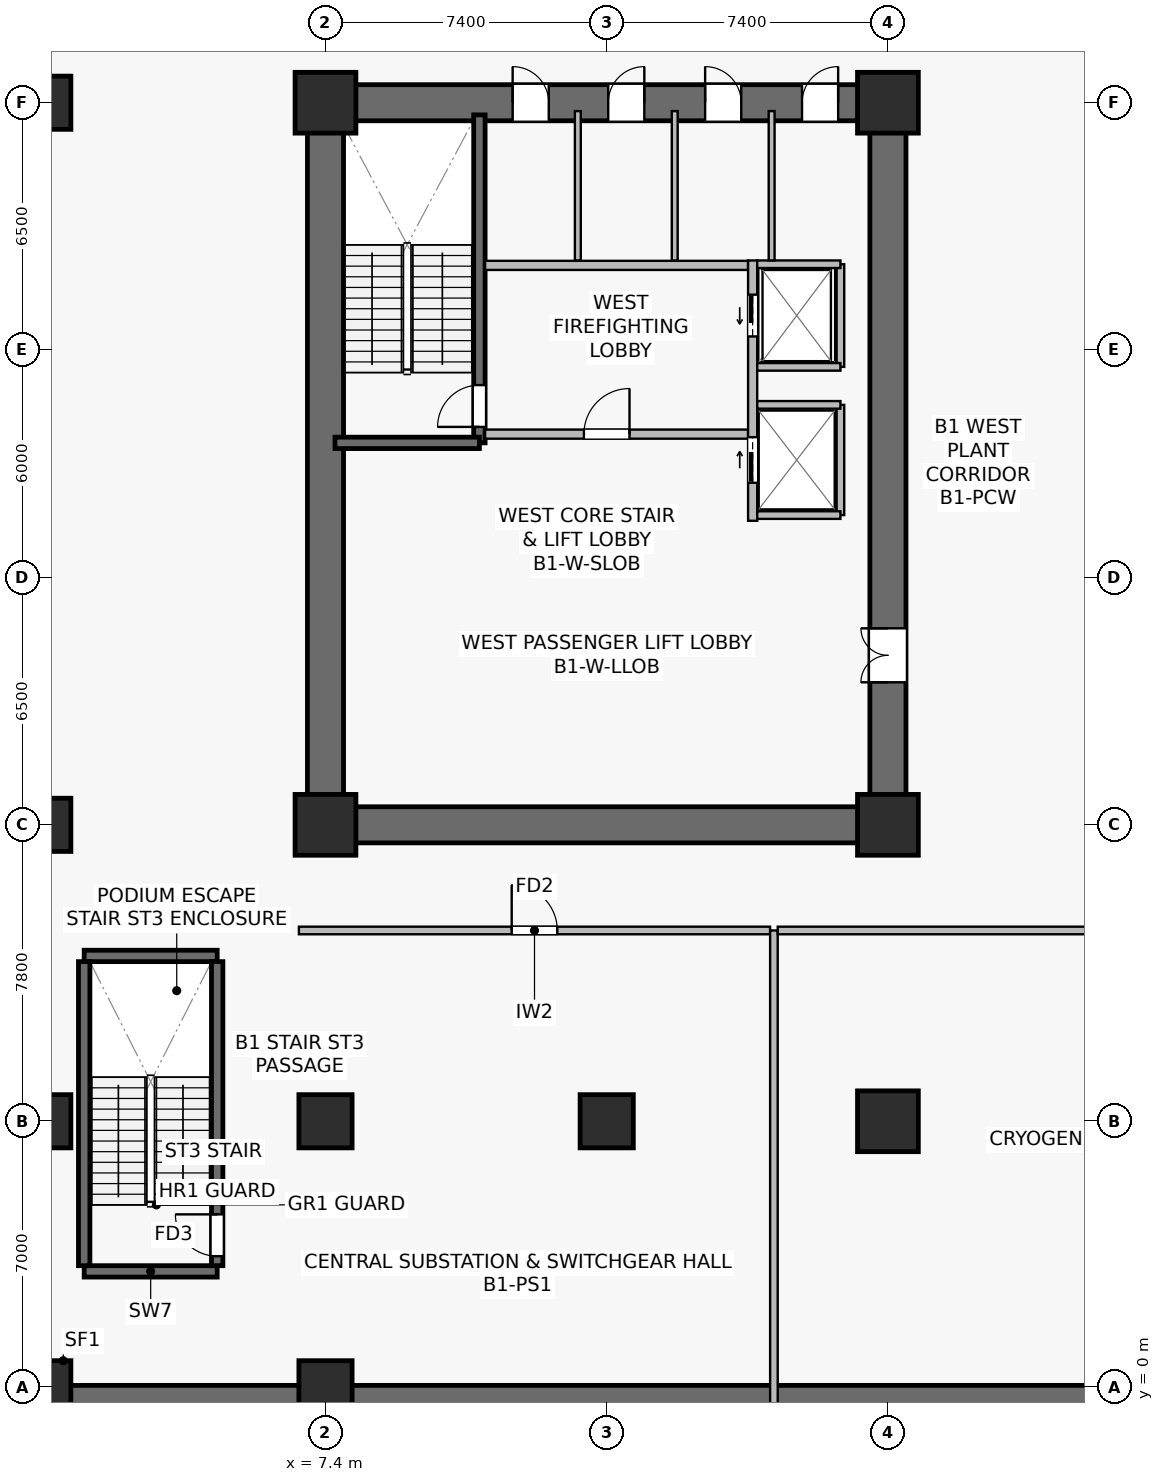
"""IFC4 building model, lengths in metres.
Left out: names, types, materials, properties, quantities, classifications, styles, units other than length and angle.
Written with IfcOpenShell. Run it as: python <this file> out.ifc"""

import sys

from ifc_helpers import new_model, si_unit, direction, frame, frame_2d, origin, origin_2d, place, context, subcontext, project, spatial, rectangle, extrude, source, transform, mapped, element, fill, save


model = new_model("IFC4")
c1 = context("Model", 3, precision=1e-05, world=origin(), true_north=direction((0.0, 1.0)))
c2 = subcontext(c1, "Body", "Model", "MODEL_VIEW")
j1 = project(units=[si_unit("LENGTHUNIT", "METRE"), si_unit("PLANEANGLEUNIT", "RADIAN")], contexts=[c1])
p1 = place(None, origin())
s1 = spatial("IfcSite", under=j1, at=p1, CompositionType="ELEMENT")
p2 = place(p1, origin())
s2 = spatial("IfcBuilding", under=s1, at=p2, CompositionType="ELEMENT")
p3 = place(p2, frame((0.0, 0.0, -4.8)))
s3 = spatial("IfcBuildingStorey", under=s2, at=p3, CompositionType="ELEMENT", Elevation=-4.8)
p4 = place(p3, frame((6.925, 14.8, 0.0), z_axis=(0.0, 0.0, 1.0), x_axis=(1.0, 0.0, 0.0)))
e1 = element("IfcWall", 1, at=p4, inside=s3, PredefinedType="SHEAR", context=c2, shape_type="SweptSolid", body=[
    extrude(rectangle(XDim=15.75, YDim=0.95, at=frame_2d((7.875, 0.0))), origin(), (0.0, 0.0, 1.0), 4.45),
])
p5 = place(p3, frame((6.925, 33.8, 0.0), z_axis=(0.0, 0.0, 1.0), x_axis=(1.0, 0.0, 0.0)))
e2 = element("IfcWall", 2, at=p5, inside=s3, PredefinedType="SHEAR", context=c2, shape_type="SweptSolid", body=[
    extrude(rectangle(XDim=15.75, YDim=0.95, at=frame_2d((7.875, 0.0))), origin(), (0.0, 0.0, 1.0), 4.45),
])
p6 = place(p5, frame((5.4, 0.0, 0.0)))
e3 = element("IfcOpeningElement", 3, at=p6, cuts=e2, PredefinedType="OPENING", context=c2, shape_type="SweptSolid", body=[
    extrude(rectangle(XDim=0.95, YDim=2.15, at=frame_2d((0.475, 1.075))), frame((0.0, 0.485, 0.0), z_axis=(0.0, -1.0, 0.0), x_axis=(1.0, 0.0, 0.0)), (0.0, 0.0, 1.0), 0.97),
])
p7 = place(p5, frame((7.915, 0.0, 0.0)))
e4 = element("IfcOpeningElement", 4, at=p7, cuts=e2, PredefinedType="OPENING", context=c2, shape_type="SweptSolid", body=[
    extrude(rectangle(XDim=0.95, YDim=2.15, at=frame_2d((0.475, 1.075))), frame((0.0, 0.485, 0.0), z_axis=(0.0, -1.0, 0.0), x_axis=(1.0, 0.0, 0.0)), (0.0, 0.0, 1.0), 0.97),
])
p8 = place(p5, frame((10.465, 0.0, 0.0)))
e5 = element("IfcOpeningElement", 5, at=p8, cuts=e2, PredefinedType="OPENING", context=c2, shape_type="SweptSolid", body=[
    extrude(rectangle(XDim=0.95, YDim=2.15, at=frame_2d((0.475, 1.075))), frame((0.0, 0.485, 0.0), z_axis=(0.0, -1.0, 0.0), x_axis=(1.0, 0.0, 0.0)), (0.0, 0.0, 1.0), 0.97),
])
p9 = place(p5, frame((13.015, 0.0, 0.0)))
e6 = element("IfcOpeningElement", 6, at=p9, cuts=e2, PredefinedType="OPENING", context=c2, shape_type="SweptSolid", body=[
    extrude(rectangle(XDim=0.95, YDim=2.15, at=frame_2d((0.475, 1.075))), frame((0.0, 0.485, 0.0), z_axis=(0.0, -1.0, 0.0), x_axis=(1.0, 0.0, 0.0)), (0.0, 0.0, 1.0), 0.97),
])
p10 = place(p3, frame((7.4, 15.275, 0.0), z_axis=(0.0, 0.0, 1.0), x_axis=(0.0, 1.0, 0.0)))
e7 = element("IfcWall", 7, at=p10, inside=s3, PredefinedType="SHEAR", context=c2, shape_type="SweptSolid", body=[
    extrude(rectangle(XDim=18.05, YDim=0.95, at=frame_2d((9.025, 0.0))), origin(), (0.0, 0.0, 1.0), 4.45),
])
p11 = place(p3, frame((22.2, 15.275, 0.0), z_axis=(0.0, 0.0, 1.0), x_axis=(0.0, 1.0, 0.0)))
e8 = element("IfcWall", 8, at=p11, inside=s3, PredefinedType="SHEAR", context=c2, shape_type="SweptSolid", body=[
    extrude(rectangle(XDim=18.05, YDim=0.95, at=frame_2d((9.025, 0.0))), origin(), (0.0, 0.0, 1.0), 4.45),
])
p12 = place(p11, frame((3.275, 0.0, 0.0)))
e9 = element("IfcOpeningElement", 9, at=p12, cuts=e8, PredefinedType="OPENING", context=c2, shape_type="SweptSolid", body=[
    extrude(rectangle(XDim=1.42, YDim=2.2, at=frame_2d((0.71, 1.1))), frame((0.0, 0.485, 0.0), z_axis=(0.0, -1.0, 0.0), x_axis=(1.0, 0.0, 0.0)), (0.0, 0.0, 1.0), 0.97),
])
p13 = place(p3, frame((11.45, 24.85, 0.0), z_axis=(0.0, 0.0, 1.0), x_axis=(0.0, 1.0, 0.0)))
e10 = element("IfcWall", 10, at=p13, inside=s3, PredefinedType="SHEAR", context=c2, shape_type="SweptSolid", body=[
    extrude(rectangle(XDim=8.63, YDim=0.3, at=frame_2d((4.315, 0.0))), origin(), (0.0, 0.0, 1.0), 4.45),
])
p14 = place(p13, frame((0.42, 0.0, 0.0)))
e11 = element("IfcOpeningElement", 11, at=p14, cuts=e10, PredefinedType="OPENING", context=c2, shape_type="SweptSolid", body=[
    extrude(rectangle(XDim=1.1, YDim=2.15, at=frame_2d((0.55, 1.075))), frame((0.0, 0.16, 0.0), z_axis=(0.0, -1.0, 0.0), x_axis=(1.0, 0.0, 0.0)), (0.0, 0.0, 1.0), 0.32),
])
p15 = place(p3, frame((7.65, 24.85, 0.0), z_axis=(0.0, 0.0, 1.0), x_axis=(1.0, 0.0, 0.0)))
e12 = element("IfcWall", 12, at=p15, inside=s3, PredefinedType="SHEAR", context=c2, shape_type="SweptSolid", body=[
    extrude(rectangle(XDim=3.8, YDim=0.3, at=frame_2d((1.9, 0.0))), origin(), (0.0, 0.0, 1.0), 4.45),
])
for number, where, z_axis, x_axis in (
    (13, (1.05, 3.05, 0.0), (0.0, 0.0, 1.0), (1.0, 0.0, 0.0)),
    (14, (1.05, 11.35, 0.0), (0.0, 0.0, 1.0), (1.0, 0.0, 0.0)),
):
    element("IfcWall", number, at=place(p3, frame(where, z_axis=z_axis, x_axis=x_axis)), inside=s3, PredefinedType="SHEAR", context=c2, shape_type="SweptSolid", body=[
        extrude(rectangle(XDim=3.5, YDim=0.3, at=frame_2d((1.75, 0.0))), origin(), (0.0, 0.0, 1.0), 4.45),
    ])
p16 = place(p3, frame((1.05, 3.2, 0.0), z_axis=(0.0, 0.0, 1.0), x_axis=(0.0, 1.0, 0.0)))
e15 = element("IfcWall", 15, at=p16, inside=s3, PredefinedType="SHEAR", context=c2, shape_type="SweptSolid", body=[
    extrude(rectangle(XDim=8.0, YDim=0.3, at=frame_2d((4.0, 0.0))), origin(), (0.0, 0.0, 1.0), 4.45),
])
p17 = place(p3, frame((4.55, 3.2, 0.0), z_axis=(0.0, 0.0, 1.0), x_axis=(0.0, 1.0, 0.0)))
e16 = element("IfcWall", 16, at=p17, inside=s3, PredefinedType="SHEAR", context=c2, shape_type="SweptSolid", body=[
    extrude(rectangle(XDim=8.0, YDim=0.3, at=frame_2d((4.0, 0.0))), origin(), (0.0, 0.0, 1.0), 4.45),
])
p18 = place(p17, frame((0.25, 0.0, 0.0)))
e17 = element("IfcOpeningElement", 17, at=p18, cuts=e16, PredefinedType="OPENING", context=c2, shape_type="SweptSolid", body=[
    extrude(rectangle(XDim=1.1, YDim=2.15, at=frame_2d((0.55, 1.075))), frame((0.0, 0.16, 0.0), z_axis=(0.0, -1.0, 0.0), x_axis=(1.0, 0.0, 0.0)), (0.0, 0.0, 1.0), 0.32),
])
p19 = place(p3, frame((-1.0, -0.375, 0.0), z_axis=(0.0, 0.0, 1.0), x_axis=(1.0, 0.0, 0.0)))
e18 = element("IfcWall", 18, at=p19, inside=s3, PredefinedType="SOLIDWALL", context=c2, shape_type="SweptSolid", body=[
    extrude(rectangle(XDim=76.8, YDim=0.85, at=frame_2d((38.4, 0.0))), origin(), (0.0, 0.0, 1.0), 4.45),
])
m1 = source(origin(), c2, "Body", "SweptSolid", [
    extrude(rectangle(XDim=1.4, YDim=1.4, at=origin_2d()), origin(), (0.0, 0.0, 1.0), 4.8),
])
p20 = place(p3, frame((14.8, 7.0, 0.0), z_axis=(0.0, 0.0, 1.0), x_axis=(1.0, 0.0, 0.0)))
e19 = element("IfcColumn", 19, at=p20, inside=s3, PredefinedType="COLUMN", context=c2, shape_type="MappedRepresentation", body=[
    mapped(m1, transform((0.0, 0.0, 0.0), scale=1.0)),
])
m2 = source(origin(), c2, "Body", "SweptSolid", [
    extrude(rectangle(XDim=1.6, YDim=1.6, at=origin_2d()), origin(), (0.0, 0.0, 1.0), 4.8),
])
for number, where, z_axis, x_axis in (
    (20, (22.2, 7.0, 0.0), (0.0, 0.0, 1.0), (1.0, 0.0, 0.0)),
    (21, (7.4, 14.8, 0.0), (0.0, 0.0, 1.0), (1.0, 0.0, 0.0)),
    (22, (22.2, 14.8, 0.0), (0.0, 0.0, 1.0), (1.0, 0.0, 0.0)),
    (23, (7.4, 33.8, 0.0), (0.0, 0.0, 1.0), (1.0, 0.0, 0.0)),
    (24, (22.2, 33.8, 0.0), (0.0, 0.0, 1.0), (1.0, 0.0, 0.0)),
):
    element("IfcColumn", number, at=place(p3, frame(where, z_axis=z_axis, x_axis=x_axis)), inside=s3, PredefinedType="COLUMN", context=c2, shape_type="MappedRepresentation", body=[
        mapped(m2, transform((0.0, 0.0, 0.0), scale=1.0)),
    ])
for number, where, z_axis, x_axis in (
    (25, (7.4, 7.0, 0.0), (0.0, 0.0, 1.0), (1.0, 0.0, 0.0)),
    (26, (0.0, 7.0, 0.0), (0.0, 0.0, 1.0), (1.0, 0.0, 0.0)),
    (27, (0.0, 14.8, 0.0), (0.0, 0.0, 1.0), (1.0, 0.0, 0.0)),
    (28, (0.0, 33.8, 0.0), (0.0, 0.0, 1.0), (1.0, 0.0, 0.0)),
    (29, (0.0, 0.0, 0.0), (0.0, 0.0, 1.0), (1.0, 0.0, 0.0)),
    (30, (7.4, 0.0, 0.0), (0.0, 0.0, 1.0), (1.0, 0.0, 0.0)),
):
    element("IfcColumn", number, at=place(p3, frame(where, z_axis=z_axis, x_axis=x_axis)), inside=s3, PredefinedType="COLUMN", context=c2, shape_type="MappedRepresentation", body=[
        mapped(m1, transform((0.0, 0.0, 0.0), scale=1.0)),
    ])
p21 = place(p3, frame((11.6, 25.08, 0.0), z_axis=(0.0, 0.0, 1.0), x_axis=(1.0, 0.0, 0.0)))
e31 = element("IfcWall", 31, at=p21, inside=s3, PredefinedType="SOLIDWALL", context=c2, shape_type="SweptSolid", body=[
    extrude(rectangle(XDim=6.92, YDim=0.24, at=frame_2d((3.46, 0.0))), origin(), (0.0, 0.0, 1.0), 3.685),
])
p22 = place(p21, frame((2.6, 0.0, 0.0)))
e32 = element("IfcOpeningElement", 32, at=p22, cuts=e31, PredefinedType="OPENING", context=c2, shape_type="SweptSolid", body=[
    extrude(rectangle(XDim=1.2, YDim=2.16, at=frame_2d((0.6, 1.08))), frame((0.0, 0.13, 0.0), z_axis=(0.0, -1.0, 0.0), x_axis=(1.0, 0.0, 0.0)), (0.0, 0.0, 1.0), 0.26),
])
p23 = place(p3, frame((11.6, 29.52, 0.0), z_axis=(0.0, 0.0, 1.0), x_axis=(1.0, 0.0, 0.0)))
e33 = element("IfcWall", 33, at=p23, inside=s3, PredefinedType="SOLIDWALL", context=c2, shape_type="SweptSolid", body=[
    extrude(rectangle(XDim=6.92, YDim=0.24, at=frame_2d((3.46, 0.0))), origin(), (0.0, 0.0, 1.0), 3.685),
])
p24 = place(p3, frame((18.64, 22.8, 0.0), z_axis=(0.0, 0.0, 1.0), x_axis=(0.0, 1.0, 0.0)))
e34 = element("IfcWall", 34, at=p24, inside=s3, PredefinedType="SOLIDWALL", context=c2, shape_type="SweptSolid", body=[
    extrude(rectangle(XDim=6.85, YDim=0.24, at=frame_2d((3.425, 0.0))), origin(), (0.0, 0.0, 1.0), 3.535),
])
p25 = place(p24, frame((4.85, 0.0, 0.0)))
e35 = element("IfcOpeningElement", 35, at=p25, cuts=e34, PredefinedType="OPENING", context=c2, shape_type="SweptSolid", body=[
    extrude(rectangle(XDim=1.1, YDim=2.22, at=frame_2d((0.55, 1.11))), frame((0.0, 0.13, 0.0), z_axis=(0.0, -1.0, 0.0), x_axis=(1.0, 0.0, 0.0)), (0.0, 0.0, 1.0), 0.26),
])
p26 = place(p24, frame((1.0, 0.0, 0.0)))
e36 = element("IfcOpeningElement", 36, at=p26, cuts=e34, PredefinedType="OPENING", context=c2, shape_type="SweptSolid", body=[
    extrude(rectangle(XDim=1.2, YDim=2.22, at=frame_2d((0.6, 1.11))), frame((0.0, 0.13, 0.0), z_axis=(0.0, -1.0, 0.0), x_axis=(1.0, 0.0, 0.0)), (0.0, 0.0, 1.0), 0.26),
])
p27 = place(p3, frame((20.95, 26.85, 0.0), z_axis=(0.0, 0.0, 1.0), x_axis=(0.0, 1.0, 0.0)))
e37 = element("IfcWall", 37, at=p27, inside=s3, PredefinedType="SOLIDWALL", context=c2, shape_type="SweptSolid", body=[
    extrude(rectangle(XDim=2.7, YDim=0.2, at=frame_2d((1.35, 0.0))), origin(), (0.0, 0.0, 1.0), 4.45),
])
p28 = place(p3, frame((18.76, 29.55, 0.0), z_axis=(0.0, 0.0, 1.0), x_axis=(1.0, 0.0, 0.0)))
e38 = element("IfcWall", 38, at=p28, inside=s3, PredefinedType="SOLIDWALL", context=c2, shape_type="SweptSolid", body=[
    extrude(rectangle(XDim=2.19, YDim=0.2, at=frame_2d((1.095, 0.0))), origin(), (0.0, 0.0, 1.0), 4.45),
])
p29 = place(p3, frame((18.76, 26.85, 0.0), z_axis=(0.0, 0.0, 1.0), x_axis=(1.0, 0.0, 0.0)))
e39 = element("IfcWall", 39, at=p29, inside=s3, PredefinedType="SOLIDWALL", context=c2, shape_type="SweptSolid", body=[
    extrude(rectangle(XDim=2.19, YDim=0.2, at=frame_2d((1.095, 0.0))), origin(), (0.0, 0.0, 1.0), 3.847),
])
p30 = place(p3, frame((20.95, 22.95, 0.0), z_axis=(0.0, 0.0, 1.0), x_axis=(0.0, 1.0, 0.0)))
e40 = element("IfcWall", 40, at=p30, inside=s3, PredefinedType="SOLIDWALL", context=c2, shape_type="SweptSolid", body=[
    extrude(rectangle(XDim=2.9, YDim=0.2, at=frame_2d((1.45, 0.0))), origin(), (0.0, 0.0, 1.0), 3.535),
])
for number, where, z_axis, x_axis in (
    (41, (18.76, 25.85, 0.0), (0.0, 0.0, 1.0), (1.0, 0.0, 0.0)),
    (42, (18.76, 22.95, 0.0), (0.0, 0.0, 1.0), (1.0, 0.0, 0.0)),
):
    element("IfcWall", number, at=place(p3, frame(where, z_axis=z_axis, x_axis=x_axis)), inside=s3, PredefinedType="SOLIDWALL", context=c2, shape_type="SweptSolid", body=[
        extrude(rectangle(XDim=2.19, YDim=0.2, at=frame_2d((1.095, 0.0))), origin(), (0.0, 0.0, 1.0), 4.45),
    ])
for number, where, z_axis, x_axis in (
    (43, (14.04, 29.65, 0.0), (0.0, 0.0, 1.0), (0.0, 1.0, 0.0)),
    (44, (16.59, 29.65, 0.0), (0.0, 0.0, 1.0), (0.0, 1.0, 0.0)),
    (45, (19.14, 29.65, 0.0), (0.0, 0.0, 1.0), (0.0, 1.0, 0.0)),
):
    element("IfcWall", number, at=place(p3, frame(where, z_axis=z_axis, x_axis=x_axis)), inside=s3, PredefinedType="PLUMBINGWALL", context=c2, shape_type="SweptSolid", body=[
        extrude(rectangle(XDim=3.93, YDim=0.155, at=frame_2d((1.965, 0.0))), origin(), (0.0, 0.0, 1.0), 4.45),
    ])
p31 = place(p3, frame((6.7, 12.02, 0.0), z_axis=(0.0, 0.0, 1.0), x_axis=(1.0, 0.0, 0.0)))
e46 = element("IfcWall", 46, at=p31, inside=s3, PredefinedType="SOLIDWALL", context=c2, shape_type="SweptSolid", body=[
    extrude(rectangle(XDim=12.4, YDim=0.2, at=frame_2d((6.2, 0.0))), origin(), (0.0, 0.0, 1.0), 3.685),
])
p32 = place(p31, frame((5.6, 0.0, 0.0)))
e47 = element("IfcOpeningElement", 47, at=p32, cuts=e46, PredefinedType="OPENING", context=c2, shape_type="SweptSolid", body=[
    extrude(rectangle(XDim=1.2, YDim=2.16, at=frame_2d((0.6, 1.08))), frame((0.0, 0.11, 0.0), z_axis=(0.0, -1.0, 0.0), x_axis=(1.0, 0.0, 0.0)), (0.0, 0.0, 1.0), 0.22),
])
p33 = place(p3, frame((19.2, -0.69, 0.0), z_axis=(0.0, 0.0, 1.0), x_axis=(0.0, 1.0, 0.0)))
e48 = element("IfcWall", 48, at=p33, inside=s3, PredefinedType="SOLIDWALL", context=c2, shape_type="SweptSolid", body=[
    extrude(rectangle(XDim=12.71, YDim=0.2, at=frame_2d((6.355, 0.0))), origin(), (0.0, 0.0, 1.0), 3.635),
])
p34 = place(p3, frame((19.3, 12.02, 0.0), z_axis=(0.0, 0.0, 1.0), x_axis=(1.0, 0.0, 0.0)))
e49 = element("IfcWall", 49, at=p34, inside=s3, PredefinedType="SOLIDWALL", context=c2, shape_type="SweptSolid", body=[
    extrude(rectangle(XDim=19.4, YDim=0.2, at=frame_2d((9.7, 0.0))), origin(), (0.0, 0.0, 1.0), 3.685),
])
p35 = place(p34, frame((9.1, 0.0, 0.0)))
e50 = element("IfcOpeningElement", 50, at=p35, cuts=e49, PredefinedType="OPENING", context=c2, shape_type="SweptSolid", body=[
    extrude(rectangle(XDim=1.2, YDim=2.16, at=frame_2d((0.6, 1.08))), frame((0.0, 0.11, 0.0), z_axis=(0.0, -1.0, 0.0), x_axis=(1.0, 0.0, 0.0)), (0.0, 0.0, 1.0), 0.22),
])
m3 = source(origin(), c2, "Body", "SweptSolid", [
    extrude(rectangle(XDim=1.1, YDim=2.15, at=frame_2d((0.55, 1.075))), frame((0.0, 0.025, 0.0), z_axis=(0.0, -1.0, 0.0), x_axis=(1.0, 0.0, 0.0)), (0.0, 0.0, 1.0), 0.05),
])
p36 = place(p14, origin())
e51 = element("IfcDoor", 51, at=p36, inside=s3, OperationType="SINGLE_SWING_LEFT", PredefinedType="DOOR", context=c2, shape_type="MappedRepresentation", body=[
    mapped(m3, transform((0.0, 0.0, 0.0), scale=1.0)),
])
fill(e11, e51)
m4 = source(origin(), c2, "Body", "SweptSolid", [
    extrude(rectangle(XDim=1.2, YDim=2.16, at=frame_2d((0.6, 1.08))), frame((0.0, 0.025, 0.0), z_axis=(0.0, -1.0, 0.0), x_axis=(1.0, 0.0, 0.0)), (0.0, 0.0, 1.0), 0.05),
])
p37 = place(p22, origin())
e52 = element("IfcDoor", 52, at=p37, inside=s3, OperationType="SINGLE_SWING_RIGHT", PredefinedType="DOOR", context=c2, shape_type="MappedRepresentation", body=[
    mapped(m4, transform((0.0, 0.0, 0.0), scale=1.0)),
])
fill(e32, e52)
m5 = source(origin(), c2, "Body", "SweptSolid", [
    extrude(rectangle(XDim=1.1, YDim=2.22, at=frame_2d((0.55, 1.11))), frame((0.0, 0.025, 0.0), z_axis=(0.0, -1.0, 0.0), x_axis=(1.0, 0.0, 0.0)), (0.0, 0.0, 1.0), 0.05),
])
p38 = place(p25, origin())
e53 = element("IfcDoor", 53, at=p38, inside=s3, OperationType="SLIDING_TO_LEFT", PredefinedType="USERDEFINED", context=c2, shape_type="MappedRepresentation", body=[
    mapped(m5, transform((0.0, 0.0, 0.0), scale=1.0)),
])
fill(e35, e53)
m6 = source(origin(), c2, "Body", "SweptSolid", [
    extrude(rectangle(XDim=1.2, YDim=2.22, at=frame_2d((0.6, 1.11))), frame((0.0, 0.025, 0.0), z_axis=(0.0, -1.0, 0.0), x_axis=(1.0, 0.0, 0.0)), (0.0, 0.0, 1.0), 0.05),
])
p39 = place(p26, origin())
e54 = element("IfcDoor", 54, at=p39, inside=s3, OperationType="SLIDING_TO_RIGHT", PredefinedType="USERDEFINED", context=c2, shape_type="MappedRepresentation", body=[
    mapped(m6, transform((0.0, 0.0, 0.0), scale=1.0)),
])
fill(e36, e54)
m7 = source(origin(), c2, "Body", "SweptSolid", [
    extrude(rectangle(XDim=1.42, YDim=2.2, at=frame_2d((0.71, 1.1))), frame((0.0, 0.025, 0.0), z_axis=(0.0, -1.0, 0.0), x_axis=(1.0, 0.0, 0.0)), (0.0, 0.0, 1.0), 0.05),
])
p40 = place(p12, origin())
e55 = element("IfcDoor", 55, at=p40, inside=s3, OperationType="DOUBLE_DOOR_SINGLE_SWING", PredefinedType="DOOR", context=c2, shape_type="MappedRepresentation", body=[
    mapped(m7, transform((0.0, 0.0, 0.0), scale=1.0)),
])
fill(e9, e55)
m8 = source(origin(), c2, "Body", "SweptSolid", [
    extrude(rectangle(XDim=0.95, YDim=2.15, at=frame_2d((0.475, 1.075))), frame((0.0, 0.025, 0.0), z_axis=(0.0, -1.0, 0.0), x_axis=(1.0, 0.0, 0.0)), (0.0, 0.0, 1.0), 0.05),
])
p41 = place(p6, origin())
e56 = element("IfcDoor", 56, at=p41, inside=s3, OperationType="SINGLE_SWING_LEFT", PredefinedType="DOOR", context=c2, shape_type="MappedRepresentation", body=[
    mapped(m8, transform((0.0, 0.0, 0.0), scale=1.0)),
])
fill(e3, e56)
p42 = place(p7, origin())
e57 = element("IfcDoor", 57, at=p42, inside=s3, OperationType="SINGLE_SWING_RIGHT", PredefinedType="DOOR", context=c2, shape_type="MappedRepresentation", body=[
    mapped(m8, transform((0.0, 0.0, 0.0), scale=1.0)),
])
fill(e4, e57)
p43 = place(p8, origin())
e58 = element("IfcDoor", 58, at=p43, inside=s3, OperationType="SINGLE_SWING_LEFT", PredefinedType="DOOR", context=c2, shape_type="MappedRepresentation", body=[
    mapped(m8, transform((0.0, 0.0, 0.0), scale=1.0)),
])
fill(e5, e58)
p44 = place(p9, origin())
e59 = element("IfcDoor", 59, at=p44, inside=s3, OperationType="SINGLE_SWING_RIGHT", PredefinedType="DOOR", context=c2, shape_type="MappedRepresentation", body=[
    mapped(m8, transform((0.0, 0.0, 0.0), scale=1.0)),
])
fill(e6, e59)
p45 = place(p18, origin())
e60 = element("IfcDoor", 60, at=p45, inside=s3, OperationType="SINGLE_SWING_RIGHT", PredefinedType="DOOR", context=c2, shape_type="MappedRepresentation", body=[
    mapped(m3, transform((0.0, 0.0, 0.0), scale=1.0)),
])
fill(e17, e60)
p46 = place(p32, origin())
e61 = element("IfcDoor", 61, at=p46, inside=s3, OperationType="SINGLE_SWING_LEFT", PredefinedType="DOOR", context=c2, shape_type="MappedRepresentation", body=[
    mapped(m4, transform((0.0, 0.0, 0.0), scale=1.0)),
])
fill(e47, e61)
save(model, sys.argv[1])
